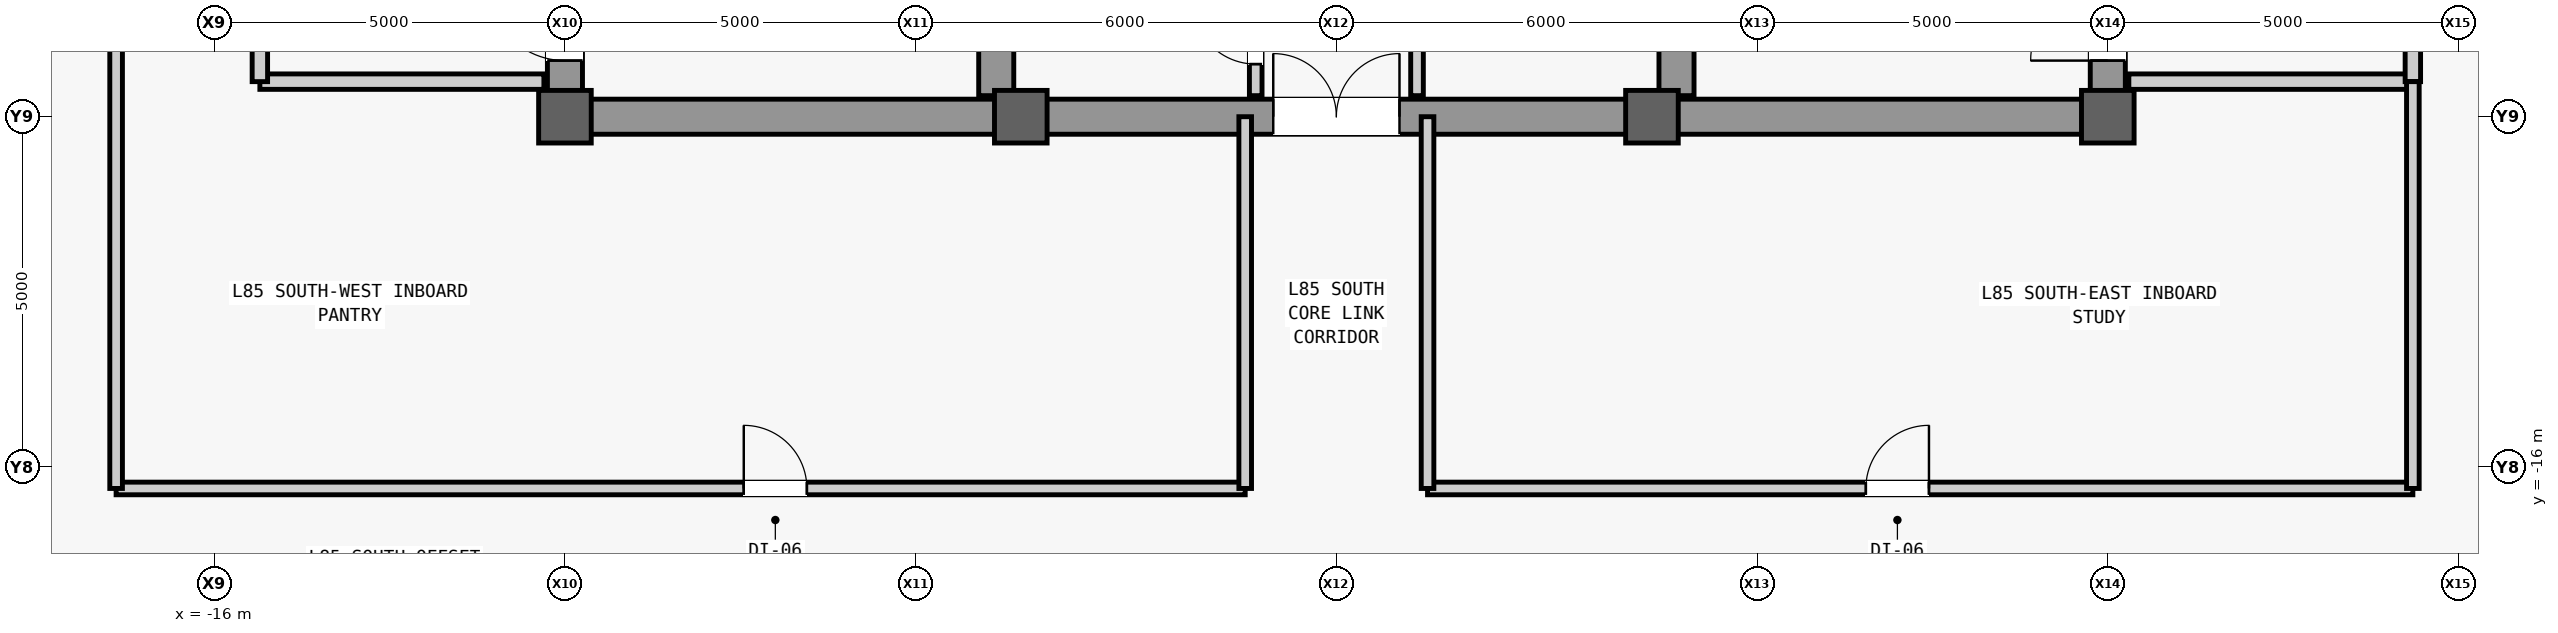
"""IFC4 building model, lengths in metres.
Left out: names, types, materials, properties, quantities, classifications, styles, units other than length and angle.
Written with IfcOpenShell. Run it as: python <this file> out.ifc"""

import sys

from ifc_helpers import new_model, si_unit, direction, frame, frame_2d, origin, origin_2d, place, context, subcontext, project, spatial, rectangle, extrude, source, transform, mapped, element, fill, save


model = new_model("IFC4")
c1 = context("Model", 3, precision=1e-05, world=origin(), true_north=direction((0.0, 1.0)))
c2 = subcontext(c1, "Body", "Model", "MODEL_VIEW")
j1 = project(units=[si_unit("LENGTHUNIT", "METRE"), si_unit("PLANEANGLEUNIT", "RADIAN")], contexts=[c1])
p1 = place(None, origin())
s1 = spatial("IfcSite", under=j1, at=p1, CompositionType="ELEMENT")
p2 = place(p1, origin())
s2 = spatial("IfcBuilding", under=s1, at=p2, CompositionType="ELEMENT")
p3 = place(p2, frame((0.0, 0.0, 358.3)))
s3 = spatial("IfcBuildingStorey", under=s2, at=p3, CompositionType="ELEMENT", Elevation=358.3)
m1 = source(origin(), c2, "Body", "SweptSolid", [
    extrude(rectangle(XDim=22.0, YDim=0.5, at=frame_2d((11.0, 0.0))), origin(), (0.0, 0.0, 1.0), 3.74),
])
p4 = place(p3, frame((-11.0, -11.0, 0.0), z_axis=(0.0, 0.0, 1.0), x_axis=(0.0, 1.0, 0.0)))
e1 = element("IfcWall", 1, at=p4, inside=s3, PredefinedType="SHEAR", context=c2, shape_type="MappedRepresentation", body=[
    mapped(m1, transform((0.0, 0.0, 0.0), scale=1.0)),
])
m2 = source(origin(), c2, "Body", "SweptSolid", [
    extrude(rectangle(XDim=1.1, YDim=2.2, at=frame_2d((0.55, 1.1))), frame((0.0, 0.26, 0.0), z_axis=(0.0, -1.0, 0.0), x_axis=(1.0, 0.0, 0.0)), (0.0, 0.0, 1.0), 0.52),
])
p5 = place(p4, frame((0.8, 0.0, 0.0)))
e2 = element("IfcOpeningElement", 2, at=p5, cuts=e1, PredefinedType="OPENING", context=c2, shape_type="MappedRepresentation", body=[
    mapped(m2, transform((0.0, 0.0, 0.0), scale=1.0)),
])
p6 = place(p4, frame((12.5, 0.0, 0.0)))
e3 = element("IfcOpeningElement", 3, at=p6, cuts=e1, PredefinedType="OPENING", context=c2, shape_type="MappedRepresentation", body=[
    mapped(m2, transform((0.0, 0.0, 0.0), scale=1.0)),
])
m3 = source(origin(), c2, "Body", "SweptSolid", [
    extrude(rectangle(XDim=0.9, YDim=2.15, at=frame_2d((0.45, 1.075))), frame((0.0, 0.26, 0.0), z_axis=(0.0, -1.0, 0.0), x_axis=(1.0, 0.0, 0.0)), (0.0, 0.0, 1.0), 0.52),
])
p7 = place(p4, frame((6.2, 0.0, 0.0)))
e4 = element("IfcOpeningElement", 4, at=p7, cuts=e1, PredefinedType="OPENING", context=c2, shape_type="MappedRepresentation", body=[
    mapped(m3, transform((0.0, 0.0, 0.0), scale=1.0)),
])
p8 = place(p4, frame((8.525, 0.0, 0.0)))
e5 = element("IfcOpeningElement", 5, at=p8, cuts=e1, PredefinedType="OPENING", context=c2, shape_type="MappedRepresentation", body=[
    mapped(m3, transform((0.0, 0.0, 0.0), scale=1.0)),
])
m4 = source(origin(), c2, "Body", "SweptSolid", [
    extrude(rectangle(XDim=1.2, YDim=2.3, at=frame_2d((0.6, 1.15))), frame((0.0, 0.26, 0.0), z_axis=(0.0, -1.0, 0.0), x_axis=(1.0, 0.0, 0.0)), (0.0, 0.0, 1.0), 0.52),
])
p9 = place(p4, frame((14.6, 0.0, 0.0)))
e6 = element("IfcOpeningElement", 6, at=p9, cuts=e1, PredefinedType="OPENING", context=c2, shape_type="MappedRepresentation", body=[
    mapped(m4, transform((0.0, 0.0, 0.0), scale=1.0)),
])
p10 = place(p4, frame((18.2, 0.0, 0.0)))
e7 = element("IfcOpeningElement", 7, at=p10, cuts=e1, PredefinedType="OPENING", context=c2, shape_type="MappedRepresentation", body=[
    mapped(m4, transform((0.0, 0.0, 0.0), scale=1.0)),
])
m5 = source(origin(), c2, "Body", "SweptSolid", [
    extrude(rectangle(XDim=1.3, YDim=2.3, at=frame_2d((0.65, 1.15))), frame((0.0, 0.26, 0.0), z_axis=(0.0, -1.0, 0.0), x_axis=(1.0, 0.0, 0.0)), (0.0, 0.0, 1.0), 0.52),
])
p11 = place(p4, frame((2.7, 0.0, 0.0)))
e8 = element("IfcOpeningElement", 8, at=p11, cuts=e1, PredefinedType="OPENING", context=c2, shape_type="MappedRepresentation", body=[
    mapped(m5, transform((0.0, 0.0, 0.0), scale=1.0)),
])
p12 = place(p3, frame((11.0, -11.0, 0.0), z_axis=(0.0, 0.0, 1.0), x_axis=(0.0, 1.0, 0.0)))
e9 = element("IfcWall", 9, at=p12, inside=s3, PredefinedType="SHEAR", context=c2, shape_type="MappedRepresentation", body=[
    mapped(m1, transform((0.0, 0.0, 0.0), scale=1.0)),
])
p13 = place(p12, frame((0.8, 0.0, 0.0)))
e10 = element("IfcOpeningElement", 10, at=p13, cuts=e9, PredefinedType="OPENING", context=c2, shape_type="MappedRepresentation", body=[
    mapped(m2, transform((0.0, 0.0, 0.0), scale=1.0)),
])
p14 = place(p12, frame((6.2, 0.0, 0.0)))
e11 = element("IfcOpeningElement", 11, at=p14, cuts=e9, PredefinedType="OPENING", context=c2, shape_type="MappedRepresentation", body=[
    mapped(m3, transform((0.0, 0.0, 0.0), scale=1.0)),
])
p15 = place(p12, frame((8.525, 0.0, 0.0)))
e12 = element("IfcOpeningElement", 12, at=p15, cuts=e9, PredefinedType="OPENING", context=c2, shape_type="MappedRepresentation", body=[
    mapped(m3, transform((0.0, 0.0, 0.0), scale=1.0)),
])
p16 = place(p12, frame((17.6, 0.0, 0.0)))
e13 = element("IfcOpeningElement", 13, at=p16, cuts=e9, PredefinedType="OPENING", context=c2, shape_type="MappedRepresentation", body=[
    mapped(m4, transform((0.0, 0.0, 0.0), scale=1.0)),
])
p17 = place(p12, frame((19.6, 0.0, 0.0)))
e14 = element("IfcOpeningElement", 14, at=p17, cuts=e9, PredefinedType="OPENING", context=c2, shape_type="MappedRepresentation", body=[
    mapped(m4, transform((0.0, 0.0, 0.0), scale=1.0)),
])
p18 = place(p12, frame((2.7, 0.0, 0.0)))
e15 = element("IfcOpeningElement", 15, at=p18, cuts=e9, PredefinedType="OPENING", context=c2, shape_type="MappedRepresentation", body=[
    mapped(m5, transform((0.0, 0.0, 0.0), scale=1.0)),
])
p19 = place(p12, frame((13.35, 0.0, 0.0)))
e16 = element("IfcOpeningElement", 16, at=p19, cuts=e9, PredefinedType="OPENING", context=c2, shape_type="MappedRepresentation", body=[
    mapped(m5, transform((0.0, 0.0, 0.0), scale=1.0)),
])
m6 = source(origin(), c2, "Body", "SweptSolid", [
    extrude(rectangle(XDim=21.4, YDim=0.5, at=frame_2d((10.7, 0.0))), origin(), (0.0, 0.0, 1.0), 3.74),
])
for number, where, z_axis, x_axis in (
    (17, (-4.85, -10.7, 0.0), (0.0, 0.0, 1.0), (0.0, 1.0, 0.0)),
    (18, (4.85, -10.7, 0.0), (0.0, 0.0, 1.0), (0.0, 1.0, 0.0)),
):
    element("IfcWall", number, at=place(p3, frame(where, z_axis=z_axis, x_axis=x_axis)), inside=s3, PredefinedType="SHEAR", context=c2, shape_type="MappedRepresentation", body=[
        mapped(m6, transform((0.0, 0.0, 0.0), scale=1.0)),
    ])
m7 = source(origin(), c2, "Body", "SweptSolid", [
    extrude(rectangle(XDim=5.9, YDim=0.5, at=frame_2d((2.95, 0.0))), origin(), (0.0, 0.0, 1.0), 3.74),
])
for number, where, z_axis, x_axis in (
    (19, (-10.75, -11.0, 0.0), (0.0, 0.0, 1.0), (1.0, 0.0, 0.0)),
    (20, (4.85, -11.0, 0.0), (0.0, 0.0, 1.0), (1.0, 0.0, 0.0)),
):
    element("IfcWall", number, at=place(p3, frame(where, z_axis=z_axis, x_axis=x_axis)), inside=s3, PredefinedType="SHEAR", context=c2, shape_type="MappedRepresentation", body=[
        mapped(m7, transform((0.0, 0.0, 0.0), scale=1.0)),
    ])
m8 = source(origin(), c2, "Body", "SweptSolid", [
    extrude(rectangle(XDim=9.2, YDim=0.5, at=frame_2d((4.6, 0.0))), origin(), (0.0, 0.0, 1.0), 3.74),
])
p20 = place(p3, frame((-4.6, -11.0, 0.0), z_axis=(0.0, 0.0, 1.0), x_axis=(1.0, 0.0, 0.0)))
e21 = element("IfcWall", 21, at=p20, inside=s3, PredefinedType="SHEAR", context=c2, shape_type="MappedRepresentation", body=[
    mapped(m8, transform((0.0, 0.0, 0.0), scale=1.0)),
])
m9 = source(origin(), c2, "Body", "SweptSolid", [
    extrude(rectangle(XDim=1.8, YDim=2.25, at=frame_2d((0.9, 1.125))), frame((0.0, 0.26, 0.0), z_axis=(0.0, -1.0, 0.0), x_axis=(1.0, 0.0, 0.0)), (0.0, 0.0, 1.0), 0.52),
])
p21 = place(p20, frame((3.7, 0.0, 0.0)))
e22 = element("IfcOpeningElement", 22, at=p21, cuts=e21, PredefinedType="OPENING", context=c2, shape_type="MappedRepresentation", body=[
    mapped(m9, transform((0.0, 0.0, 0.0), scale=1.0)),
])
m10 = source(origin(), c2, "Body", "SweptSolid", [
    extrude(rectangle(XDim=0.75, YDim=0.75, at=origin_2d()), origin(), (0.0, 0.0, 1.0), 4.0),
])
for number, where, z_axis, x_axis in (
    (23, (-11.0, -11.0, 0.0), (0.0, 0.0, 1.0), (1.0, 0.0, 0.0)),
    (24, (-4.5, -11.0, 0.0), (0.0, 0.0, 1.0), (1.0, 0.0, 0.0)),
    (25, (4.5, -11.0, 0.0), (0.0, 0.0, 1.0), (1.0, 0.0, 0.0)),
    (26, (11.0, -11.0, 0.0), (0.0, 0.0, 1.0), (1.0, 0.0, 0.0)),
):
    element("IfcColumn", number, at=place(p3, frame(where, z_axis=z_axis, x_axis=x_axis)), inside=s3, PredefinedType="COLUMN", context=c2, shape_type="MappedRepresentation", body=[
        mapped(m10, transform((0.0, 0.0, 0.0), scale=1.0)),
    ])
m11 = source(origin(), c2, "Body", "SweptSolid", [
    extrude(rectangle(XDim=4.05, YDim=0.22, at=frame_2d((2.025, 0.0))), origin(), (0.0, 0.0, 1.0), 3.74),
])
p22 = place(p3, frame((-15.35, -10.5, 0.0), z_axis=(0.0, 0.0, 1.0), x_axis=(1.0, 0.0, 0.0)))
e27 = element("IfcWall", 27, at=p22, inside=s3, PredefinedType="PARTITIONING", context=c2, shape_type="MappedRepresentation", body=[
    mapped(m11, transform((0.0, 0.0, 0.0), scale=1.0)),
])
m12 = source(origin(), c2, "Body", "SweptSolid", [
    extrude(rectangle(XDim=4.4, YDim=0.22, at=frame_2d((2.2, 0.0))), origin(), (0.0, 0.0, 1.0), 3.74),
])
p23 = place(p3, frame((-15.35, -10.5, 0.0), z_axis=(0.0, 0.0, 1.0), x_axis=(0.0, 1.0, 0.0)))
e28 = element("IfcWall", 28, at=p23, inside=s3, PredefinedType="PARTITIONING", context=c2, shape_type="MappedRepresentation", body=[
    mapped(m12, transform((0.0, 0.0, 0.0), scale=1.0)),
])
m13 = source(origin(), c2, "Body", "SweptSolid", [
    extrude(rectangle(XDim=1.2, YDim=2.2, at=frame_2d((0.6, 1.1))), frame((0.0, 0.12, 0.0), z_axis=(0.0, -1.0, 0.0), x_axis=(1.0, 0.0, 0.0)), (0.0, 0.0, 1.0), 0.24),
])
p24 = place(p23, frame((1.6, 0.0, 0.0)))
e29 = element("IfcOpeningElement", 29, at=p24, cuts=e28, PredefinedType="OPENING", context=c2, shape_type="MappedRepresentation", body=[
    mapped(m13, transform((0.0, 0.0, 0.0), scale=1.0)),
])
p25 = place(p3, frame((11.3, -10.5, 0.0), z_axis=(0.0, 0.0, 1.0), x_axis=(1.0, 0.0, 0.0)))
e30 = element("IfcWall", 30, at=p25, inside=s3, PredefinedType="PARTITIONING", context=c2, shape_type="MappedRepresentation", body=[
    mapped(m11, transform((0.0, 0.0, 0.0), scale=1.0)),
])
p26 = place(p3, frame((15.35, -10.5, 0.0), z_axis=(0.0, 0.0, 1.0), x_axis=(0.0, 1.0, 0.0)))
e31 = element("IfcWall", 31, at=p26, inside=s3, PredefinedType="PARTITIONING", context=c2, shape_type="MappedRepresentation", body=[
    mapped(m12, transform((0.0, 0.0, 0.0), scale=1.0)),
])
p27 = place(p26, frame((1.6, 0.0, 0.0)))
e32 = element("IfcOpeningElement", 32, at=p27, cuts=e31, PredefinedType="OPENING", context=c2, shape_type="MappedRepresentation", body=[
    mapped(m13, transform((0.0, 0.0, 0.0), scale=1.0)),
])
m14 = source(origin(), c2, "Body", "SweptSolid", [
    extrude(rectangle(XDim=5.4, YDim=0.18, at=frame_2d((2.7, 0.0))), origin(), (0.0, 0.0, 1.0), 3.74),
])
p28 = place(p3, frame((-1.15, -10.7, 0.0), z_axis=(0.0, 0.0, 1.0), x_axis=(0.0, 1.0, 0.0)))
e33 = element("IfcWall", 33, at=p28, inside=s3, PredefinedType="PARTITIONING", context=c2, shape_type="MappedRepresentation", body=[
    mapped(m14, transform((0.0, 0.0, 0.0), scale=1.0)),
])
m15 = source(origin(), c2, "Body", "SweptSolid", [
    extrude(rectangle(XDim=0.9, YDim=2.15, at=frame_2d((0.45, 1.075))), frame((0.0, 0.1, 0.0), z_axis=(0.0, -1.0, 0.0), x_axis=(1.0, 0.0, 0.0)), (0.0, 0.0, 1.0), 0.2),
])
p29 = place(p28, frame((0.45, 0.0, 0.0)))
e34 = element("IfcOpeningElement", 34, at=p29, cuts=e33, PredefinedType="OPENING", context=c2, shape_type="MappedRepresentation", body=[
    mapped(m15, transform((0.0, 0.0, 0.0), scale=1.0)),
])
p30 = place(p28, frame((2.25, 0.0, 0.0)))
e35 = element("IfcOpeningElement", 35, at=p30, cuts=e33, PredefinedType="OPENING", context=c2, shape_type="MappedRepresentation", body=[
    mapped(m15, transform((0.0, 0.0, 0.0), scale=1.0)),
])
p31 = place(p28, frame((4.05, 0.0, 0.0)))
e36 = element("IfcOpeningElement", 36, at=p31, cuts=e33, PredefinedType="OPENING", context=c2, shape_type="MappedRepresentation", body=[
    mapped(m15, transform((0.0, 0.0, 0.0), scale=1.0)),
])
p32 = place(p3, frame((1.15, -10.7, 0.0), z_axis=(0.0, 0.0, 1.0), x_axis=(0.0, 1.0, 0.0)))
e37 = element("IfcWall", 37, at=p32, inside=s3, PredefinedType="PARTITIONING", context=c2, shape_type="MappedRepresentation", body=[
    mapped(m14, transform((0.0, 0.0, 0.0), scale=1.0)),
])
p33 = place(p32, frame((0.95, 0.0, 0.0)))
e38 = element("IfcOpeningElement", 38, at=p33, cuts=e37, PredefinedType="OPENING", context=c2, shape_type="MappedRepresentation", body=[
    mapped(m15, transform((0.0, 0.0, 0.0), scale=1.0)),
])
p34 = place(p32, frame((3.65, 0.0, 0.0)))
e39 = element("IfcOpeningElement", 39, at=p34, cuts=e37, PredefinedType="OPENING", context=c2, shape_type="MappedRepresentation", body=[
    mapped(m15, transform((0.0, 0.0, 0.0), scale=1.0)),
])
m16 = source(origin(), c2, "Body", "SweptSolid", [
    extrude(rectangle(XDim=16.1, YDim=0.18, at=frame_2d((8.05, 0.0))), origin(), (0.0, 0.0, 1.0), 3.74),
])
p35 = place(p3, frame((-17.4, -16.3, 0.0), z_axis=(0.0, 0.0, 1.0), x_axis=(1.0, 0.0, 0.0)))
e40 = element("IfcWall", 40, at=p35, inside=s3, PredefinedType="PARTITIONING", context=c2, shape_type="MappedRepresentation", body=[
    mapped(m16, transform((0.0, 0.0, 0.0), scale=1.0)),
])
p36 = place(p35, frame((8.95, 0.0, 0.0)))
e41 = element("IfcOpeningElement", 41, at=p36, cuts=e40, PredefinedType="OPENING", context=c2, shape_type="MappedRepresentation", body=[
    mapped(m15, transform((0.0, 0.0, 0.0), scale=1.0)),
])
m17 = source(origin(), c2, "Body", "SweptSolid", [
    extrude(rectangle(XDim=6.5, YDim=0.18, at=frame_2d((3.25, 0.0))), origin(), (0.0, 0.0, 1.0), 3.74),
])
p37 = place(p3, frame((-17.4, -16.3, 0.0), z_axis=(0.0, 0.0, 1.0), x_axis=(0.0, 1.0, 0.0)))
e42 = element("IfcWall", 42, at=p37, inside=s3, PredefinedType="PARTITIONING", context=c2, shape_type="MappedRepresentation", body=[
    mapped(m17, transform((0.0, 0.0, 0.0), scale=1.0)),
])
m18 = source(origin(), c2, "Body", "SweptSolid", [
    extrude(rectangle(XDim=5.3, YDim=0.18, at=frame_2d((2.65, 0.0))), origin(), (0.0, 0.0, 1.0), 3.74),
])
p38 = place(p3, frame((-1.3, -16.3, 0.0), z_axis=(0.0, 0.0, 1.0), x_axis=(0.0, 1.0, 0.0)))
e43 = element("IfcWall", 43, at=p38, inside=s3, PredefinedType="PARTITIONING", context=c2, shape_type="MappedRepresentation", body=[
    mapped(m18, transform((0.0, 0.0, 0.0), scale=1.0)),
])
m19 = source(origin(), c2, "Body", "SweptSolid", [
    extrude(rectangle(XDim=14.05, YDim=0.18, at=frame_2d((7.025, 0.0))), origin(), (0.0, 0.0, 1.0), 3.74),
])
p39 = place(p3, frame((1.3, -16.3, 0.0), z_axis=(0.0, 0.0, 1.0), x_axis=(1.0, 0.0, 0.0)))
e44 = element("IfcWall", 44, at=p39, inside=s3, PredefinedType="PARTITIONING", context=c2, shape_type="MappedRepresentation", body=[
    mapped(m19, transform((0.0, 0.0, 0.0), scale=1.0)),
])
p40 = place(p39, frame((6.25, 0.0, 0.0)))
e45 = element("IfcOpeningElement", 45, at=p40, cuts=e44, PredefinedType="OPENING", context=c2, shape_type="MappedRepresentation", body=[
    mapped(m15, transform((0.0, 0.0, 0.0), scale=1.0)),
])
p41 = place(p3, frame((1.3, -16.3, 0.0), z_axis=(0.0, 0.0, 1.0), x_axis=(0.0, 1.0, 0.0)))
e46 = element("IfcWall", 46, at=p41, inside=s3, PredefinedType="PARTITIONING", context=c2, shape_type="MappedRepresentation", body=[
    mapped(m18, transform((0.0, 0.0, 0.0), scale=1.0)),
])
m20 = source(origin(), c2, "Body", "SweptSolid", [
    extrude(rectangle(XDim=5.8, YDim=0.18, at=frame_2d((2.9, 0.0))), origin(), (0.0, 0.0, 1.0), 3.74),
])
p42 = place(p3, frame((15.35, -16.3, 0.0), z_axis=(0.0, 0.0, 1.0), x_axis=(0.0, 1.0, 0.0)))
e47 = element("IfcWall", 47, at=p42, inside=s3, PredefinedType="PARTITIONING", context=c2, shape_type="MappedRepresentation", body=[
    mapped(m20, transform((0.0, 0.0, 0.0), scale=1.0)),
])
m21 = source(origin(), c2, "Body", "SweptSolid", [
    extrude(rectangle(XDim=1.1, YDim=2.2, at=frame_2d((0.55, 1.1))), frame((0.0, 0.025, 0.0), z_axis=(0.0, -1.0, 0.0), x_axis=(1.0, 0.0, 0.0)), (0.0, 0.0, 1.0), 0.05),
])
p43 = place(p5, origin())
e48 = element("IfcDoor", 48, at=p43, inside=s3, OperationType="SINGLE_SWING_RIGHT", PredefinedType="DOOR", context=c2, shape_type="MappedRepresentation", body=[
    mapped(m21, transform((0.0, 0.0, 0.0), scale=1.0)),
])
fill(e2, e48)
p44 = place(p13, origin())
e49 = element("IfcDoor", 49, at=p44, inside=s3, OperationType="SINGLE_SWING_LEFT", PredefinedType="DOOR", context=c2, shape_type="MappedRepresentation", body=[
    mapped(m21, transform((0.0, 0.0, 0.0), scale=1.0)),
])
fill(e10, e49)
m22 = source(origin(), c2, "Body", "SweptSolid", [
    extrude(rectangle(XDim=0.9, YDim=2.15, at=frame_2d((0.45, 1.075))), frame((0.0, 0.025, 0.0), z_axis=(0.0, -1.0, 0.0), x_axis=(1.0, 0.0, 0.0)), (0.0, 0.0, 1.0), 0.05),
])
p45 = place(p29, origin())
e50 = element("IfcDoor", 50, at=p45, inside=s3, OperationType="SINGLE_SWING_RIGHT", PredefinedType="DOOR", context=c2, shape_type="MappedRepresentation", body=[
    mapped(m22, transform((0.0, 0.0, 0.0), scale=1.0)),
])
fill(e34, e50)
m23 = source(origin(), c2, "Body", "SweptSolid", [
    extrude(rectangle(XDim=1.8, YDim=2.25, at=frame_2d((0.9, 1.125))), frame((0.0, 0.025, 0.0), z_axis=(0.0, -1.0, 0.0), x_axis=(1.0, 0.0, 0.0)), (0.0, 0.0, 1.0), 0.05),
])
p46 = place(p21, origin())
e51 = element("IfcDoor", 51, at=p46, inside=s3, OperationType="SINGLE_SWING_LEFT", PredefinedType="DOOR", context=c2, shape_type="MappedRepresentation", body=[
    mapped(m23, transform((0.0, 0.0, 0.0), scale=1.0)),
])
fill(e22, e51)
p47 = place(p36, origin())
e52 = element("IfcDoor", 52, at=p47, inside=s3, OperationType="SINGLE_SWING_LEFT", PredefinedType="DOOR", context=c2, shape_type="MappedRepresentation", body=[
    mapped(m22, transform((0.0, 0.0, 0.0), scale=1.0)),
])
fill(e41, e52)
p48 = place(p40, origin())
e53 = element("IfcDoor", 53, at=p48, inside=s3, OperationType="SINGLE_SWING_RIGHT", PredefinedType="DOOR", context=c2, shape_type="MappedRepresentation", body=[
    mapped(m22, transform((0.0, 0.0, 0.0), scale=1.0)),
])
fill(e45, e53)
save(model, sys.argv[1])
